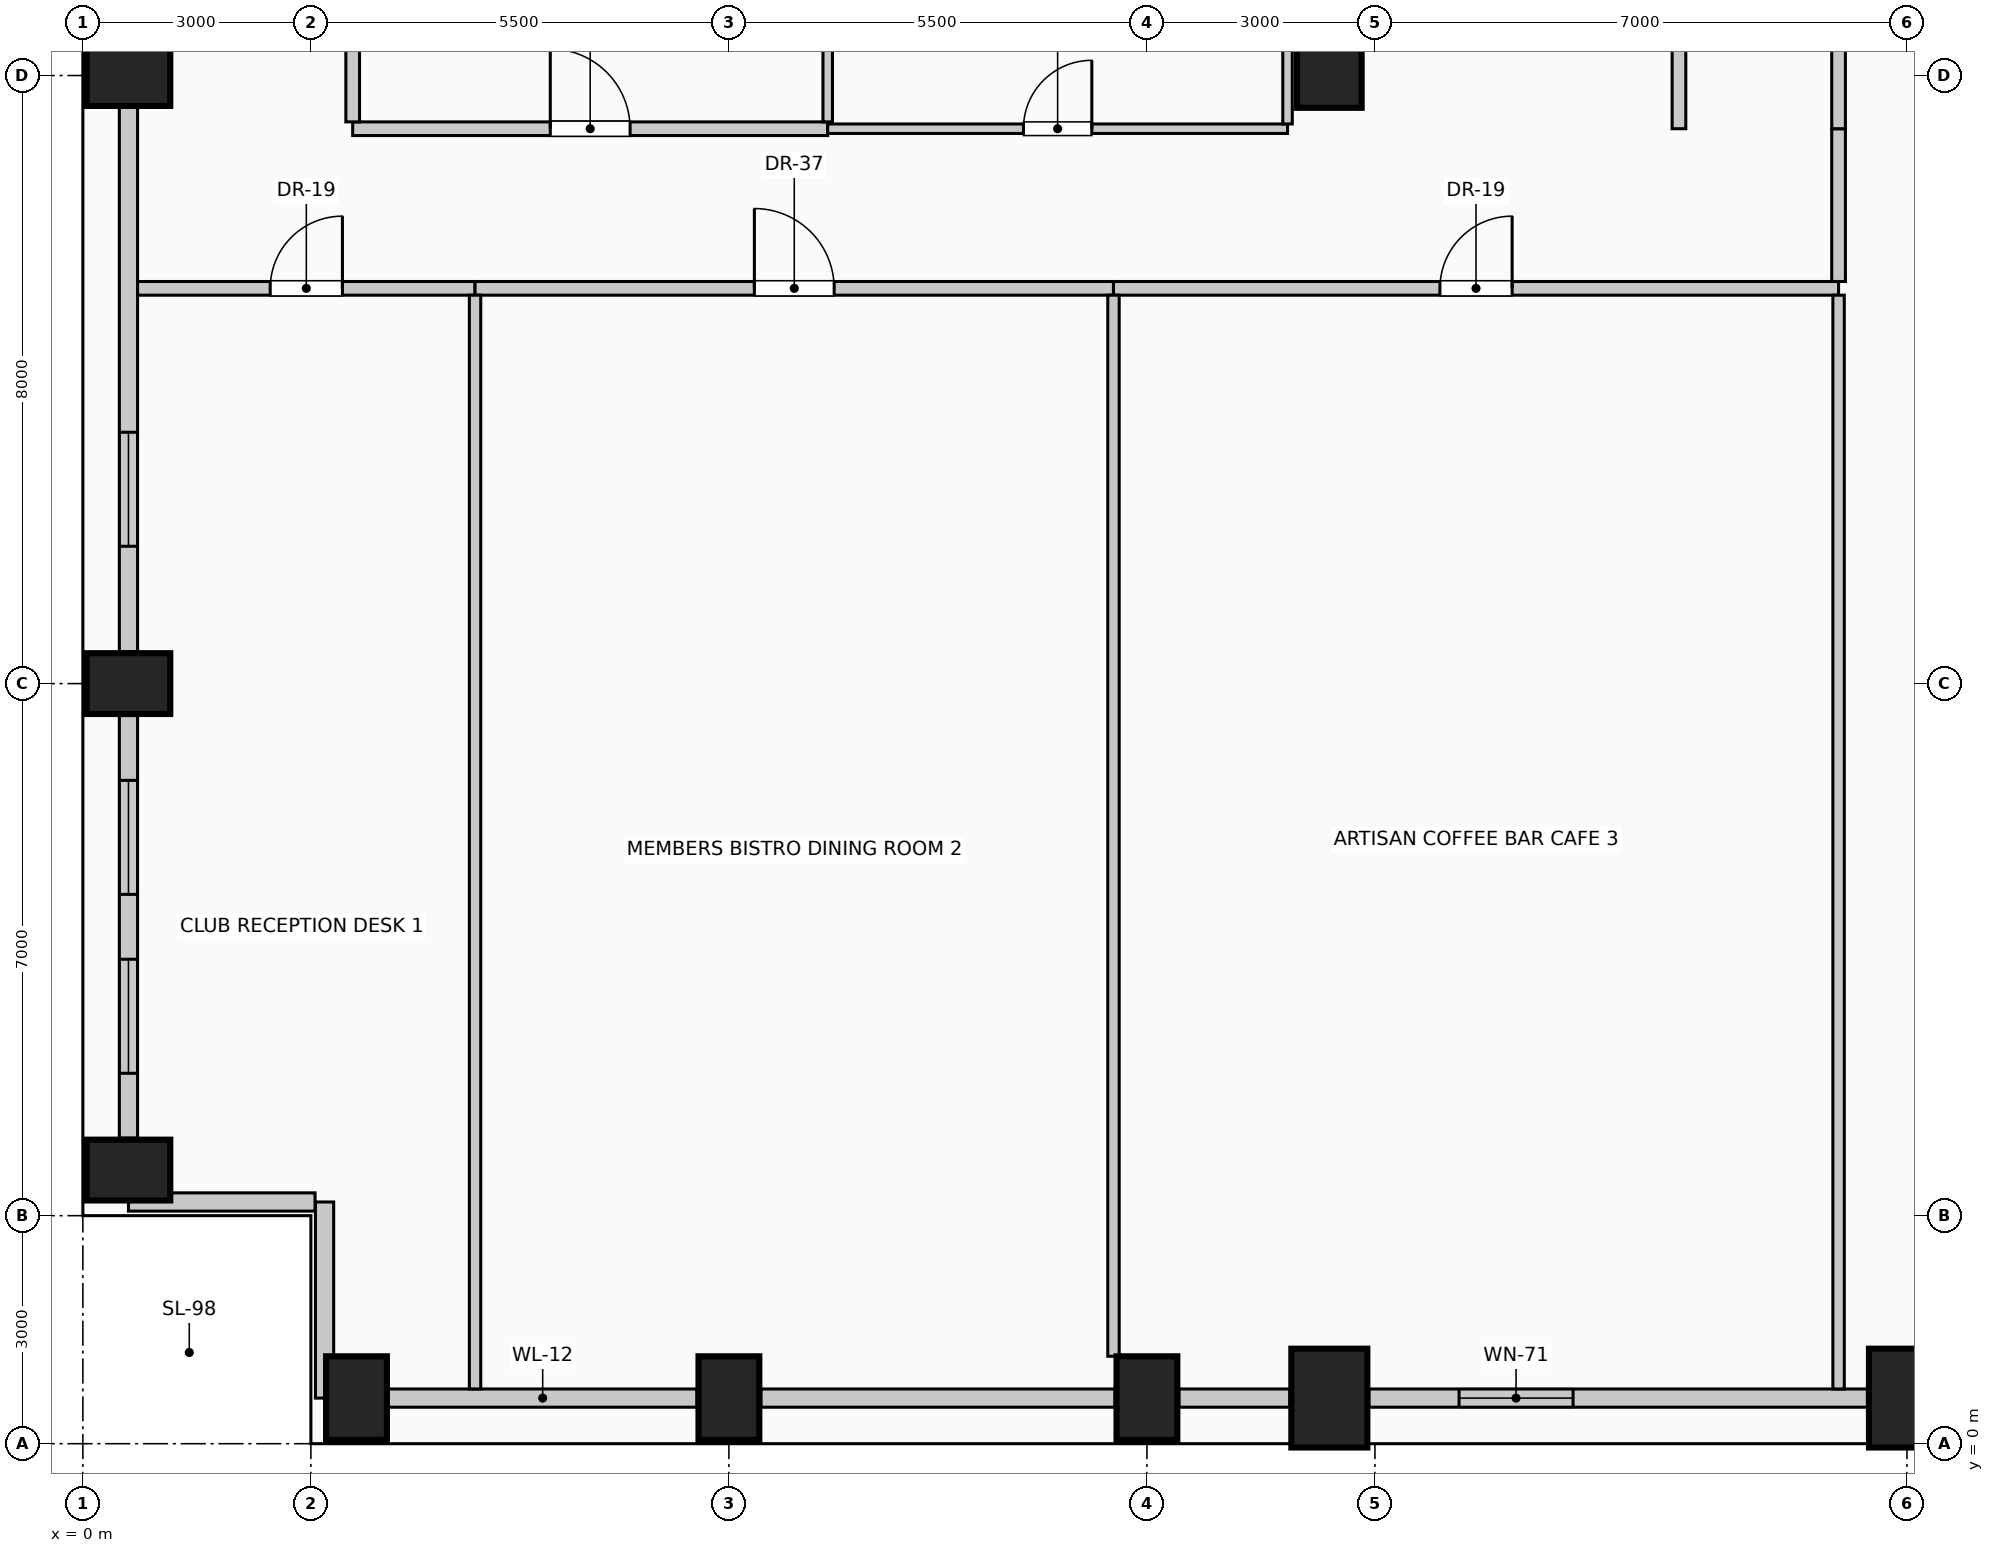
"""IFC4 building model, lengths in metres.
Left out: names, types, materials, properties, quantities, classifications, styles, units other than length and angle.
Written with IfcOpenShell. Run it as: python <this file> out.ifc"""

import sys

from ifc_helpers import new_model, si_unit, direction, frame, frame_2d, origin, origin_2d, place, context, subcontext, project, spatial, rectangle, circle, extrude, element, fill, save


model = new_model("IFC4")
c1 = context("Model", 3, precision=1e-05, world=origin(), true_north=direction((0.0, 1.0)))
c2 = subcontext(c1, "Body", "Model", "MODEL_VIEW")
j1 = project(units=[si_unit("LENGTHUNIT", "METRE"), si_unit("PLANEANGLEUNIT", "RADIAN")], contexts=[c1])
p1 = place(None, origin())
s1 = spatial("IfcSite", under=j1, at=p1, CompositionType="ELEMENT")
p2 = place(p1, origin())
s2 = spatial("IfcBuilding", under=s1, at=p2, CompositionType="ELEMENT")
p3 = place(p2, frame((0.0, 0.0, 178.6)))
s3 = spatial("IfcBuildingStorey", under=s2, at=p3, CompositionType="ELEMENT", Elevation=178.6)
for number, where, z_axis, x_axis in (
    (1, (3.6, 0.6, 0.0), (0.0, 0.0, 1.0), (1.0, 0.0, 0.0)),
    (2, (8.5, 0.6, 0.0), (0.0, 0.0, 1.0), (1.0, 0.0, 0.0)),
    (3, (14.0, 0.6, 0.0), (0.0, 0.0, 1.0), (1.0, 0.0, 0.0)),
):
    element("IfcColumn", number, at=place(p3, frame(where, z_axis=z_axis, x_axis=x_axis)), inside=s3, PredefinedType="COLUMN", context=c2, shape_type="SweptSolid", body=[
        extrude(rectangle(XDim=0.8, YDim=1.1, at=origin_2d()), origin(), (0.0, 0.0, 1.0), 4.0),
    ])
for number, where, z_axis, x_axis in (
    (4, (16.4, 0.6, 0.0), (0.0, 0.0, 1.0), (1.0, 0.0, 0.0)),
    (5, (24.0, 0.6, 0.0), (0.0, 0.0, 1.0), (1.0, 0.0, 0.0)),
):
    element("IfcColumn", number, at=place(p3, frame(where, z_axis=z_axis, x_axis=x_axis)), inside=s3, PredefinedType="COLUMN", context=c2, shape_type="SweptSolid", body=[
        extrude(rectangle(XDim=1.0, YDim=1.3, at=origin_2d()), origin(), (0.0, 0.0, 1.0), 4.0),
    ])
for number, where, z_axis, x_axis in (
    (6, (0.6, 3.6, 0.0), (0.0, 0.0, 1.0), (0.0, 1.0, 0.0)),
    (7, (0.6, 10.0, 0.0), (0.0, 0.0, 1.0), (0.0, 1.0, 0.0)),
    (8, (0.6, 18.0, 0.0), (0.0, 0.0, 1.0), (0.0, 1.0, 0.0)),
):
    element("IfcColumn", number, at=place(p3, frame(where, z_axis=z_axis, x_axis=x_axis)), inside=s3, PredefinedType="COLUMN", context=c2, shape_type="SweptSolid", body=[
        extrude(rectangle(XDim=0.8, YDim=1.1, at=origin_2d()), origin(), (0.0, 0.0, 1.0), 4.0),
    ])
p4 = place(p3, frame((16.4, 18.0, 0.0), z_axis=(0.0, 0.0, 1.0), x_axis=(1.0, 0.0, 0.0)))
e9 = element("IfcColumn", 9, at=p4, inside=s3, PredefinedType="COLUMN", context=c2, shape_type="SweptSolid", body=[
    extrude(circle(Radius=0.425, at=origin_2d()), origin(), (0.0, 0.0, 1.0), 4.0),
])
p5 = place(p3, frame((8.08, 0.6, 0.0), z_axis=(0.0, 0.0, 1.0), x_axis=(-1.0, 0.0, 0.0)))
e10 = element("IfcWall", 10, at=p5, inside=s3, PredefinedType="SOLIDWALL", context=c2, shape_type="SweptSolid", body=[
    extrude(rectangle(XDim=4.06, YDim=0.24, at=frame_2d((2.03, 0.0))), origin(), (0.0, 0.0, 1.0), 3.0),
])
p6 = place(p3, frame((13.58, 0.6, 0.0), z_axis=(0.0, 0.0, 1.0), x_axis=(-1.0, 0.0, 0.0)))
e11 = element("IfcWall", 11, at=p6, inside=s3, PredefinedType="SOLIDWALL", context=c2, shape_type="SweptSolid", body=[
    extrude(rectangle(XDim=4.66, YDim=0.24, at=frame_2d((2.33, 0.0))), origin(), (0.0, 0.0, 1.0), 3.0),
])
p7 = place(p3, frame((15.88, 0.6, 0.0), z_axis=(0.0, 0.0, 1.0), x_axis=(-1.0, 0.0, 0.0)))
e12 = element("IfcWall", 12, at=p7, inside=s3, PredefinedType="SOLIDWALL", context=c2, shape_type="SweptSolid", body=[
    extrude(rectangle(XDim=1.46, YDim=0.24, at=frame_2d((0.73, 0.0))), origin(), (0.0, 0.0, 1.0), 3.0),
])
p8 = place(p3, frame((23.48, 0.6, 0.0), z_axis=(0.0, 0.0, 1.0), x_axis=(-1.0, 0.0, 0.0)))
e13 = element("IfcWall", 13, at=p8, inside=s3, PredefinedType="SOLIDWALL", context=c2, shape_type="SweptSolid", body=[
    extrude(rectangle(XDim=6.56, YDim=0.24, at=frame_2d((3.28, 0.0))), origin(), (0.0, 0.0, 1.0), 3.0),
])
p9 = place(p8, frame((3.873, 0.0, 0.42)))
e14 = element("IfcOpeningElement", 14, at=p9, cuts=e13, PredefinedType="OPENING", context=c2, shape_type="SweptSolid", body=[
    extrude(rectangle(XDim=1.5, YDim=2.2, at=frame_2d((0.75, 1.1))), frame((0.0, 0.13, 0.0), z_axis=(0.0, -1.0, 0.0), x_axis=(1.0, 0.0, 0.0)), (0.0, 0.0, 1.0), 0.26),
])
p10 = place(p3, frame((0.6, 4.02, 0.0), z_axis=(0.0, 0.0, 1.0), x_axis=(0.0, 1.0, 0.0)))
e15 = element("IfcWall", 15, at=p10, inside=s3, PredefinedType="SOLIDWALL", context=c2, shape_type="SweptSolid", body=[
    extrude(rectangle(XDim=5.56, YDim=0.24, at=frame_2d((2.78, 0.0))), origin(), (0.0, 0.0, 1.0), 3.0),
])
p11 = place(p10, frame((0.853, 0.0, 0.42)))
e16 = element("IfcOpeningElement", 16, at=p11, cuts=e15, PredefinedType="OPENING", context=c2, shape_type="SweptSolid", body=[
    extrude(rectangle(XDim=1.5, YDim=2.2, at=frame_2d((0.75, 1.1))), frame((0.0, 0.13, 0.0), z_axis=(0.0, -1.0, 0.0), x_axis=(1.0, 0.0, 0.0)), (0.0, 0.0, 1.0), 0.26),
])
p12 = place(p10, frame((3.207, 0.0, 0.42)))
e17 = element("IfcOpeningElement", 17, at=p12, cuts=e15, PredefinedType="OPENING", context=c2, shape_type="SweptSolid", body=[
    extrude(rectangle(XDim=1.5, YDim=2.2, at=frame_2d((0.75, 1.1))), frame((0.0, 0.13, 0.0), z_axis=(0.0, -1.0, 0.0), x_axis=(1.0, 0.0, 0.0)), (0.0, 0.0, 1.0), 0.26),
])
p13 = place(p3, frame((0.6, 10.42, 0.0), z_axis=(0.0, 0.0, 1.0), x_axis=(0.0, 1.0, 0.0)))
e18 = element("IfcWall", 18, at=p13, inside=s3, PredefinedType="SOLIDWALL", context=c2, shape_type="SweptSolid", body=[
    extrude(rectangle(XDim=7.16, YDim=0.24, at=frame_2d((3.58, 0.0))), origin(), (0.0, 0.0, 1.0), 3.0),
])
p14 = place(p13, frame((1.387, 0.0, 0.42)))
e19 = element("IfcOpeningElement", 19, at=p14, cuts=e18, PredefinedType="OPENING", context=c2, shape_type="SweptSolid", body=[
    extrude(rectangle(XDim=1.5, YDim=2.2, at=frame_2d((0.75, 1.1))), frame((0.0, 0.13, 0.0), z_axis=(0.0, -1.0, 0.0), x_axis=(1.0, 0.0, 0.0)), (0.0, 0.0, 1.0), 0.26),
])
p15 = place(p3, frame((3.18, 0.6, 0.0), z_axis=(0.0, 0.0, 1.0), x_axis=(0.0, 1.0, 0.0)))
e20 = element("IfcWall", 20, at=p15, inside=s3, PredefinedType="SOLIDWALL", context=c2, shape_type="SweptSolid", body=[
    extrude(rectangle(XDim=2.58, YDim=0.24, at=frame_2d((1.29, 0.0))), origin(), (0.0, 0.0, 1.0), 3.75),
])
p16 = place(p3, frame((3.055, 3.18, 0.0), z_axis=(0.0, 0.0, 1.0), x_axis=(-1.0, 0.0, 0.0)))
e21 = element("IfcWall", 21, at=p16, inside=s3, PredefinedType="SOLIDWALL", context=c2, shape_type="SweptSolid", body=[
    extrude(rectangle(XDim=2.455, YDim=0.24, at=frame_2d((1.228, 0.0))), origin(), (0.0, 0.0, 1.0), 3.75),
])
p17 = place(p3, frame((0.72, 15.2, 0.0), z_axis=(0.0, 0.0, 1.0), x_axis=(1.0, 0.0, 0.0)))
e22 = element("IfcWall", 22, at=p17, inside=s3, PredefinedType="PARTITIONING", context=c2, shape_type="SweptSolid", body=[
    extrude(rectangle(XDim=4.44, YDim=0.18, at=frame_2d((2.22, 0.0))), origin(), (0.0, 0.0, 1.0), 3.75),
])
p18 = place(p17, frame((1.745, 0.0, 0.0)))
e23 = element("IfcOpeningElement", 23, at=p18, cuts=e22, PredefinedType="OPENING", context=c2, shape_type="SweptSolid", body=[
    extrude(rectangle(XDim=0.95, YDim=2.15, at=frame_2d((0.475, 1.075))), frame((0.0, 0.1, 0.0), z_axis=(0.0, -1.0, 0.0), x_axis=(1.0, 0.0, 0.0)), (0.0, 0.0, 1.0), 0.2),
])
p19 = place(p3, frame((5.16, 15.2, 0.0), z_axis=(0.0, 0.0, 1.0), x_axis=(1.0, 0.0, 0.0)))
e24 = element("IfcWall", 24, at=p19, inside=s3, PredefinedType="PARTITIONING", context=c2, shape_type="SweptSolid", body=[
    extrude(rectangle(XDim=8.4, YDim=0.18, at=frame_2d((4.2, 0.0))), origin(), (0.0, 0.0, 1.0), 3.75),
])
p20 = place(p19, frame((3.675, 0.0, 0.0)))
e25 = element("IfcOpeningElement", 25, at=p20, cuts=e24, PredefinedType="OPENING", context=c2, shape_type="SweptSolid", body=[
    extrude(rectangle(XDim=1.05, YDim=2.15, at=frame_2d((0.525, 1.075))), frame((0.0, 0.1, 0.0), z_axis=(0.0, -1.0, 0.0), x_axis=(1.0, 0.0, 0.0)), (0.0, 0.0, 1.0), 0.2),
])
p21 = place(p3, frame((13.56, 15.2, 0.0), z_axis=(0.0, 0.0, 1.0), x_axis=(1.0, 0.0, 0.0)))
e26 = element("IfcWall", 26, at=p21, inside=s3, PredefinedType="PARTITIONING", context=c2, shape_type="SweptSolid", body=[
    extrude(rectangle(XDim=9.54, YDim=0.18, at=frame_2d((4.77, 0.0))), origin(), (0.0, 0.0, 1.0), 3.75),
])
p22 = place(p21, frame((4.295, 0.0, 0.0)))
e27 = element("IfcOpeningElement", 27, at=p22, cuts=e26, PredefinedType="OPENING", context=c2, shape_type="SweptSolid", body=[
    extrude(rectangle(XDim=0.95, YDim=2.15, at=frame_2d((0.475, 1.075))), frame((0.0, 0.1, 0.0), z_axis=(0.0, -1.0, 0.0), x_axis=(1.0, 0.0, 0.0)), (0.0, 0.0, 1.0), 0.2),
])
p23 = place(p3, frame((3.55, 17.3, 0.0), z_axis=(0.0, 0.0, 1.0), x_axis=(1.0, 0.0, 0.0)))
e28 = element("IfcWall", 28, at=p23, inside=s3, PredefinedType="PARTITIONING", context=c2, shape_type="SweptSolid", body=[
    extrude(rectangle(XDim=6.25, YDim=0.18, at=frame_2d((3.125, 0.0))), origin(), (0.0, 0.0, 1.0), 3.75),
])
p24 = place(p23, frame((2.6, 0.0, 0.0)))
e29 = element("IfcOpeningElement", 29, at=p24, cuts=e28, PredefinedType="OPENING", context=c2, shape_type="SweptSolid", body=[
    extrude(rectangle(XDim=1.05, YDim=2.15, at=frame_2d((0.525, 1.075))), frame((0.0, 0.1, 0.0), z_axis=(0.0, -1.0, 0.0), x_axis=(1.0, 0.0, 0.0)), (0.0, 0.0, 1.0), 0.2),
])
p25 = place(p3, frame((9.8, 17.3, 0.0), z_axis=(0.0, 0.0, 1.0), x_axis=(1.0, 0.0, 0.0)))
e30 = element("IfcWall", 30, at=p25, inside=s3, PredefinedType="PARTITIONING", context=c2, shape_type="SweptSolid", body=[
    extrude(rectangle(XDim=6.05, YDim=0.125, at=frame_2d((3.025, 0.0))), origin(), (0.0, 0.0, 1.0), 3.75),
])
p26 = place(p25, frame((2.575, 0.0, 0.0)))
e31 = element("IfcOpeningElement", 31, at=p26, cuts=e30, PredefinedType="OPENING", context=c2, shape_type="SweptSolid", body=[
    extrude(rectangle(XDim=0.9, YDim=2.1, at=frame_2d((0.45, 1.05))), frame((0.0, 0.073, 0.0), z_axis=(0.0, -1.0, 0.0), x_axis=(1.0, 0.0, 0.0)), (0.0, 0.0, 1.0), 0.145),
])
p27 = place(p3, frame((3.55, 17.39, 0.0), z_axis=(0.0, 0.0, 1.0), x_axis=(0.0, 1.0, 0.0)))
e32 = element("IfcWall", 32, at=p27, inside=s3, PredefinedType="PARTITIONING", context=c2, shape_type="SweptSolid", body=[
    extrude(rectangle(XDim=7.335, YDim=0.18, at=frame_2d((3.667, 0.0))), origin(), (0.0, 0.0, 1.0), 3.75),
])
p28 = place(p3, frame((5.16, 0.72, 0.0), z_axis=(0.0, 0.0, 1.0), x_axis=(0.0, 1.0, 0.0)))
e33 = element("IfcWall", 33, at=p28, inside=s3, PredefinedType="PARTITIONING", context=c2, shape_type="SweptSolid", body=[
    extrude(rectangle(XDim=14.39, YDim=0.15, at=frame_2d((7.195, 0.0))), origin(), (0.0, 0.0, 1.0), 3.75),
])
p29 = place(p3, frame((9.8, 17.39, 0.0), z_axis=(0.0, 0.0, 1.0), x_axis=(0.0, 1.0, 0.0)))
e34 = element("IfcWall", 34, at=p29, inside=s3, PredefinedType="PARTITIONING", context=c2, shape_type="SweptSolid", body=[
    extrude(rectangle(XDim=7.335, YDim=0.125, at=frame_2d((3.667, 0.0))), origin(), (0.0, 0.0, 1.0), 3.75),
])
p30 = place(p3, frame((13.56, 1.15, 0.0), z_axis=(0.0, 0.0, 1.0), x_axis=(0.0, 1.0, 0.0)))
e35 = element("IfcWall", 35, at=p30, inside=s3, PredefinedType="PARTITIONING", context=c2, shape_type="SweptSolid", body=[
    extrude(rectangle(XDim=13.96, YDim=0.15, at=frame_2d((6.98, 0.0))), origin(), (0.0, 0.0, 1.0), 3.75),
])
p31 = place(p3, frame((15.85, 17.363, 0.0), z_axis=(0.0, 0.0, 1.0), x_axis=(0.0, 1.0, 0.0)))
e36 = element("IfcWall", 36, at=p31, inside=s3, PredefinedType="PARTITIONING", context=c2, shape_type="SweptSolid", body=[
    extrude(rectangle(XDim=7.363, YDim=0.125, at=frame_2d((3.681, 0.0))), origin(), (0.0, 0.0, 1.0), 3.75),
])
p32 = place(p3, frame((21.0, 17.3, 0.0), z_axis=(0.0, 0.0, 1.0), x_axis=(0.0, 1.0, 0.0)))
e37 = element("IfcWall", 37, at=p32, inside=s3, PredefinedType="PARTITIONING", context=c2, shape_type="SweptSolid", body=[
    extrude(rectangle(XDim=7.425, YDim=0.18, at=frame_2d((3.712, 0.0))), origin(), (0.0, 0.0, 1.0), 3.75),
])
p33 = place(p32, frame((3.188, 0.0, 0.0)))
e38 = element("IfcOpeningElement", 38, at=p33, cuts=e37, PredefinedType="OPENING", context=c2, shape_type="SweptSolid", body=[
    extrude(rectangle(XDim=1.05, YDim=2.15, at=frame_2d((0.525, 1.075))), frame((0.0, 0.1, 0.0), z_axis=(0.0, -1.0, 0.0), x_axis=(1.0, 0.0, 0.0)), (0.0, 0.0, 1.0), 0.2),
])
p34 = place(p3, frame((23.1, 0.72, 0.0), z_axis=(0.0, 0.0, 1.0), x_axis=(0.0, 1.0, 0.0)))
e39 = element("IfcWall", 39, at=p34, inside=s3, PredefinedType="PARTITIONING", context=c2, shape_type="SweptSolid", body=[
    extrude(rectangle(XDim=14.39, YDim=0.15, at=frame_2d((7.195, 0.0))), origin(), (0.0, 0.0, 1.0), 3.75),
])
p35 = place(p3, frame((23.1, 15.29, 0.0), z_axis=(0.0, 0.0, 1.0), x_axis=(0.0, 1.0, 0.0)))
e40 = element("IfcWall", 40, at=p35, inside=s3, PredefinedType="PARTITIONING", context=c2, shape_type="SweptSolid", body=[
    extrude(rectangle(XDim=2.01, YDim=0.18, at=frame_2d((1.005, 0.0))), origin(), (0.0, 0.0, 1.0), 3.75),
])
p36 = place(p3, frame((23.1, 17.3, 0.0), z_axis=(0.0, 0.0, 1.0), x_axis=(0.0, 1.0, 0.0)))
e41 = element("IfcWall", 41, at=p36, inside=s3, PredefinedType="PARTITIONING", context=c2, shape_type="SweptSolid", body=[
    extrude(rectangle(XDim=9.51, YDim=0.18, at=frame_2d((4.755, 0.0))), origin(), (0.0, 0.0, 1.0), 3.75),
])
p37 = place(p9, origin())
e42 = element("IfcWindow", 42, at=p37, inside=s3, PartitioningType="SINGLE_PANEL", PredefinedType="WINDOW", context=c2, shape_type="SweptSolid", body=[
    extrude(rectangle(XDim=1.5, YDim=2.2, at=frame_2d((0.75, 1.1))), frame((0.0, 0.03, 0.0), z_axis=(0.0, -1.0, 0.0), x_axis=(1.0, 0.0, 0.0)), (0.0, 0.0, 1.0), 0.06),
])
fill(e14, e42)
p38 = place(p11, origin())
e43 = element("IfcWindow", 43, at=p38, inside=s3, PartitioningType="SINGLE_PANEL", PredefinedType="WINDOW", context=c2, shape_type="SweptSolid", body=[
    extrude(rectangle(XDim=1.5, YDim=2.2, at=frame_2d((0.75, 1.1))), frame((0.0, 0.03, 0.0), z_axis=(0.0, -1.0, 0.0), x_axis=(1.0, 0.0, 0.0)), (0.0, 0.0, 1.0), 0.06),
])
fill(e16, e43)
p39 = place(p12, origin())
e44 = element("IfcWindow", 44, at=p39, inside=s3, PartitioningType="SINGLE_PANEL", PredefinedType="WINDOW", context=c2, shape_type="SweptSolid", body=[
    extrude(rectangle(XDim=1.5, YDim=2.2, at=frame_2d((0.75, 1.1))), frame((0.0, 0.03, 0.0), z_axis=(0.0, -1.0, 0.0), x_axis=(1.0, 0.0, 0.0)), (0.0, 0.0, 1.0), 0.06),
])
fill(e17, e44)
p40 = place(p14, origin())
e45 = element("IfcWindow", 45, at=p40, inside=s3, PartitioningType="SINGLE_PANEL", PredefinedType="WINDOW", context=c2, shape_type="SweptSolid", body=[
    extrude(rectangle(XDim=1.5, YDim=2.2, at=frame_2d((0.75, 1.1))), frame((0.0, 0.03, 0.0), z_axis=(0.0, -1.0, 0.0), x_axis=(1.0, 0.0, 0.0)), (0.0, 0.0, 1.0), 0.06),
])
fill(e19, e45)
p41 = place(p18, origin())
e46 = element("IfcDoor", 46, at=p41, inside=s3, OperationType="SINGLE_SWING_RIGHT", PredefinedType="DOOR", context=c2, shape_type="SweptSolid", body=[
    extrude(rectangle(XDim=0.95, YDim=2.15, at=frame_2d((0.475, 1.075))), frame((0.0, 0.025, 0.0), z_axis=(0.0, -1.0, 0.0), x_axis=(1.0, 0.0, 0.0)), (0.0, 0.0, 1.0), 0.05),
])
fill(e23, e46)
p42 = place(p20, origin())
e47 = element("IfcDoor", 47, at=p42, inside=s3, OperationType="SINGLE_SWING_LEFT", PredefinedType="DOOR", context=c2, shape_type="SweptSolid", body=[
    extrude(rectangle(XDim=1.05, YDim=2.15, at=frame_2d((0.525, 1.075))), frame((0.0, 0.025, 0.0), z_axis=(0.0, -1.0, 0.0), x_axis=(1.0, 0.0, 0.0)), (0.0, 0.0, 1.0), 0.05),
])
fill(e25, e47)
p43 = place(p22, origin())
e48 = element("IfcDoor", 48, at=p43, inside=s3, OperationType="SINGLE_SWING_RIGHT", PredefinedType="DOOR", context=c2, shape_type="SweptSolid", body=[
    extrude(rectangle(XDim=0.95, YDim=2.15, at=frame_2d((0.475, 1.075))), frame((0.0, 0.025, 0.0), z_axis=(0.0, -1.0, 0.0), x_axis=(1.0, 0.0, 0.0)), (0.0, 0.0, 1.0), 0.05),
])
fill(e27, e48)
p44 = place(p24, origin())
e49 = element("IfcDoor", 49, at=p44, inside=s3, OperationType="SINGLE_SWING_LEFT", PredefinedType="DOOR", context=c2, shape_type="SweptSolid", body=[
    extrude(rectangle(XDim=1.05, YDim=2.15, at=frame_2d((0.525, 1.075))), frame((0.0, 0.025, 0.0), z_axis=(0.0, -1.0, 0.0), x_axis=(1.0, 0.0, 0.0)), (0.0, 0.0, 1.0), 0.05),
])
fill(e29, e49)
p45 = place(p26, origin())
e50 = element("IfcDoor", 50, at=p45, inside=s3, OperationType="SINGLE_SWING_RIGHT", PredefinedType="DOOR", context=c2, shape_type="SweptSolid", body=[
    extrude(rectangle(XDim=0.9, YDim=2.1, at=frame_2d((0.45, 1.05))), frame((0.0, 0.025, 0.0), z_axis=(0.0, -1.0, 0.0), x_axis=(1.0, 0.0, 0.0)), (0.0, 0.0, 1.0), 0.05),
])
fill(e31, e50)
save(model, sys.argv[1])
